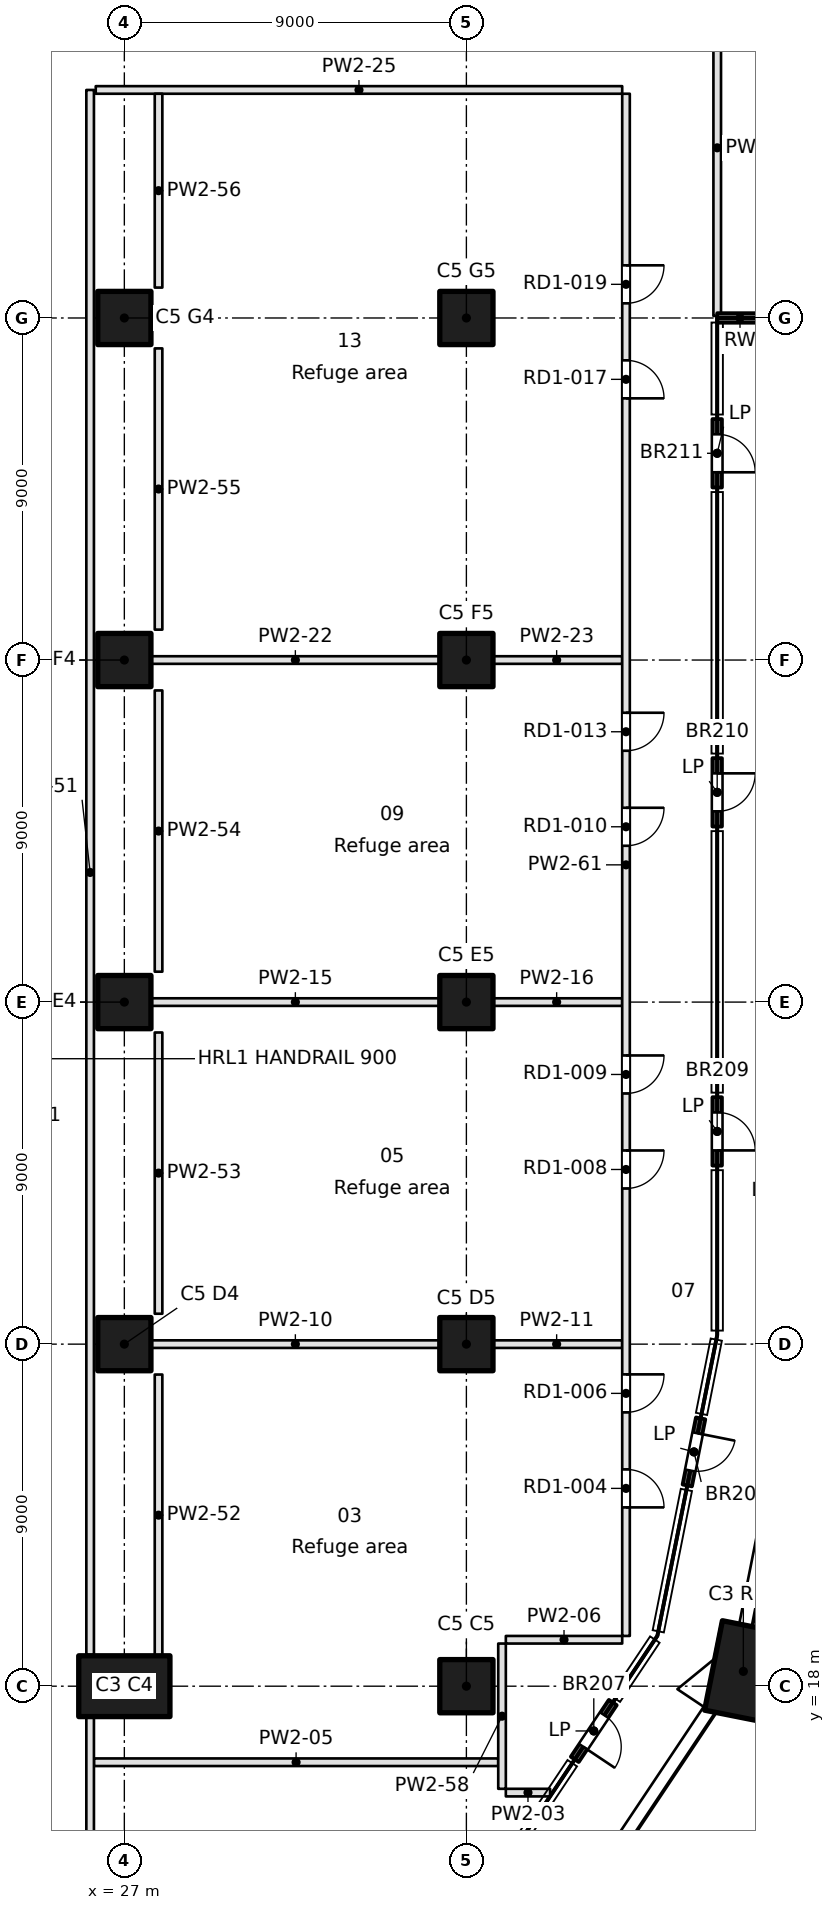
"""IFC4 building model, lengths in metres.
Left out: names, types, materials, properties, quantities, classifications, styles, units other than length and angle.
Written with IfcOpenShell. Run it as: python <this file> out.ifc"""

import sys

from ifc_helpers import new_model, si_unit, direction, frame, frame_2d, origin, origin_2d, place, context, subcontext, project, spatial, rectangle, extrude, element, fill, save


model = new_model("IFC4")
c1 = context("Model", 3, precision=1e-05, world=origin(), true_north=direction((0.0, 1.0)))
c2 = subcontext(c1, "Body", "Model", "MODEL_VIEW")
j1 = project(units=[si_unit("LENGTHUNIT", "METRE"), si_unit("PLANEANGLEUNIT", "RADIAN")], contexts=[c1])
p1 = place(None, origin())
s1 = spatial("IfcSite", under=j1, at=p1, CompositionType="ELEMENT")
p2 = place(p1, origin())
s2 = spatial("IfcBuilding", under=s1, at=p2, CompositionType="ELEMENT")
p3 = place(p2, frame((0.0, 0.0, 80.2)))
s3 = spatial("IfcBuildingStorey", under=s2, at=p3, CompositionType="ELEMENT", Elevation=80.2)
for number, where, z_axis, x_axis in (
    (1, (43.287, 18.39, 0.0), (0.0, 0.0, 1.0), (0.195, 0.981, 0.0)),
    (2, (27.0, 18.0, 0.0), (0.0, 0.0, 1.0), (1.0, 0.0, 0.0)),
):
    element("IfcColumn", number, at=place(p3, frame(where, z_axis=z_axis, x_axis=x_axis)), inside=s3, PredefinedType="COLUMN", context=c2, shape_type="SweptSolid", body=[
        extrude(rectangle(XDim=2.4, YDim=1.6, at=origin_2d()), origin(), (0.0, 0.0, 1.0), 4.6),
    ])
for number, where, z_axis, x_axis in (
    (3, (27.0, 27.0, 0.0), (0.0, 0.0, 1.0), (1.0, 0.0, 0.0)),
    (4, (27.0, 36.0, 0.0), (0.0, 0.0, 1.0), (1.0, 0.0, 0.0)),
    (5, (27.0, 45.0, 0.0), (0.0, 0.0, 1.0), (1.0, 0.0, 0.0)),
    (6, (27.0, 54.0, 0.0), (0.0, 0.0, 1.0), (1.0, 0.0, 0.0)),
    (7, (36.0, 18.0, 0.0), (0.0, 0.0, 1.0), (1.0, 0.0, 0.0)),
    (8, (36.0, 27.0, 0.0), (0.0, 0.0, 1.0), (1.0, 0.0, 0.0)),
    (9, (36.0, 36.0, 0.0), (0.0, 0.0, 1.0), (1.0, 0.0, 0.0)),
    (10, (36.0, 45.0, 0.0), (0.0, 0.0, 1.0), (1.0, 0.0, 0.0)),
    (11, (36.0, 54.0, 0.0), (0.0, 0.0, 1.0), (1.0, 0.0, 0.0)),
):
    element("IfcColumn", number, at=place(p3, frame(where, z_axis=z_axis, x_axis=x_axis)), inside=s3, PredefinedType="COLUMN", context=c2, shape_type="SweptSolid", body=[
        extrude(rectangle(XDim=1.4, YDim=1.4, at=origin_2d()), origin(), (0.0, 0.0, 1.0), 4.6),
    ])
p4 = place(p3, frame((38.852, 16.074, 0.0), z_axis=(0.0, 0.0, 1.0), x_axis=(0.555576323502, 0.83146554274, 0.0)))
e12 = element("IfcWall", 12, at=p4, inside=s3, PredefinedType="SOLIDWALL", context=c2, shape_type="SweptSolid", body=[
    extrude(rectangle(XDim=1.8, YDim=0.25, at=frame_2d((0.9, 0.0))), origin(), (0.0, 0.0, 1.0), 4.2),
])
p5 = place(p4, frame((0.4, 0.0, 0.0)))
e13 = element("IfcOpeningElement", 13, at=p5, cuts=e12, PredefinedType="OPENING", context=c2, shape_type="SweptSolid", body=[
    extrude(rectangle(XDim=1.0, YDim=2.1, at=frame_2d((0.5, 1.05))), frame((0.0, 0.125, 0.0), z_axis=(0.0, -1.0, 0.0), x_axis=(1.0, 0.0, 0.0)), (0.0, 0.0, 1.0), 0.25),
])
p6 = place(p3, frame((41.812, 23.281, 0.0), z_axis=(0.0, 0.0, 1.0), x_axis=(0.19517704197, 0.980768026746, 0.0)))
e14 = element("IfcWall", 14, at=p6, inside=s3, PredefinedType="SOLIDWALL", context=c2, shape_type="SweptSolid", body=[
    extrude(rectangle(XDim=1.8, YDim=0.25, at=frame_2d((0.9, 0.0))), origin(), (0.0, 0.0, 1.0), 4.2),
])
p7 = place(p6, frame((0.4, 0.0, 0.0)))
e15 = element("IfcOpeningElement", 15, at=p7, cuts=e14, PredefinedType="OPENING", context=c2, shape_type="SweptSolid", body=[
    extrude(rectangle(XDim=1.0, YDim=2.1, at=frame_2d((0.5, 1.05))), frame((0.0, 0.125, 0.0), z_axis=(0.0, -1.0, 0.0), x_axis=(1.0, 0.0, 0.0)), (0.0, 0.0, 1.0), 0.25),
])
p8 = place(p3, frame((42.599, 31.697, 0.0), z_axis=(0.0, 0.0, 1.0), x_axis=(0.0, 1.0, 0.0)))
e16 = element("IfcWall", 16, at=p8, inside=s3, PredefinedType="SOLIDWALL", context=c2, shape_type="SweptSolid", body=[
    extrude(rectangle(XDim=1.8, YDim=0.25, at=frame_2d((0.9, 0.0))), origin(), (0.0, 0.0, 1.0), 4.2),
])
p9 = place(p8, frame((0.4, 0.0, 0.0)))
e17 = element("IfcOpeningElement", 17, at=p9, cuts=e16, PredefinedType="OPENING", context=c2, shape_type="SweptSolid", body=[
    extrude(rectangle(XDim=1.0, YDim=2.1, at=frame_2d((0.5, 1.05))), frame((0.0, 0.125, 0.0), z_axis=(0.0, -1.0, 0.0), x_axis=(1.0, 0.0, 0.0)), (0.0, 0.0, 1.0), 0.25),
])
p10 = place(p3, frame((42.599, 40.619, 0.0), z_axis=(0.0, 0.0, 1.0), x_axis=(0.0, 1.0, 0.0)))
e18 = element("IfcWall", 18, at=p10, inside=s3, PredefinedType="SOLIDWALL", context=c2, shape_type="SweptSolid", body=[
    extrude(rectangle(XDim=1.8, YDim=0.25, at=frame_2d((0.9, 0.0))), origin(), (0.0, 0.0, 1.0), 4.2),
])
p11 = place(p10, frame((0.4, 0.0, 0.0)))
e19 = element("IfcOpeningElement", 19, at=p11, cuts=e18, PredefinedType="OPENING", context=c2, shape_type="SweptSolid", body=[
    extrude(rectangle(XDim=1.0, YDim=2.1, at=frame_2d((0.5, 1.05))), frame((0.0, 0.125, 0.0), z_axis=(0.0, -1.0, 0.0), x_axis=(1.0, 0.0, 0.0)), (0.0, 0.0, 1.0), 0.25),
])
p12 = place(p3, frame((42.599, 49.54, 0.0), z_axis=(0.0, 0.0, 1.0), x_axis=(0.0, 1.0, 0.0)))
e20 = element("IfcWall", 20, at=p12, inside=s3, PredefinedType="SOLIDWALL", context=c2, shape_type="SweptSolid", body=[
    extrude(rectangle(XDim=1.8, YDim=0.25, at=frame_2d((0.9, 0.0))), origin(), (0.0, 0.0, 1.0), 4.2),
])
p13 = place(p12, frame((0.4, 0.0, 0.0)))
e21 = element("IfcOpeningElement", 21, at=p13, cuts=e20, PredefinedType="OPENING", context=c2, shape_type="SweptSolid", body=[
    extrude(rectangle(XDim=1.0, YDim=2.1, at=frame_2d((0.5, 1.05))), frame((0.0, 0.125, 0.0), z_axis=(0.0, -1.0, 0.0), x_axis=(1.0, 0.0, 0.0)), (0.0, 0.0, 1.0), 0.25),
])
p14 = place(p3, frame((42.599, 54.001, 0.0), z_axis=(0.0, 0.0, 1.0), x_axis=(1.0, 0.0, 0.0)))
e22 = element("IfcWall", 22, at=p14, inside=s3, PredefinedType="SOLIDWALL", context=c2, shape_type="SweptSolid", body=[
    extrude(rectangle(XDim=1.201, YDim=0.25, at=frame_2d((0.6, 0.0))), origin(), (0.0, 0.0, 1.0), 4.2),
])
p15 = place(p3, frame((38.203, 15.2, 0.0), z_axis=(0.0, 0.0, 1.0), x_axis=(-1.0, 0.0, 0.0)))
e23 = element("IfcWall", 23, at=p15, inside=s3, PredefinedType="PARTITIONING", context=c2, shape_type="SweptSolid", body=[
    extrude(rectangle(XDim=1.165, YDim=0.2, at=frame_2d((0.583, 0.0))), origin(), (0.0, 0.0, 1.0), 4.2),
])
p16 = place(p3, frame((26.2, 15.999, 0.0), z_axis=(0.0, 0.0, 1.0), x_axis=(1.0, 0.0, 0.0)))
e24 = element("IfcWall", 24, at=p16, inside=s3, PredefinedType="PARTITIONING", context=c2, shape_type="SweptSolid", body=[
    extrude(rectangle(XDim=10.638, YDim=0.2, at=frame_2d((5.319, 0.0))), origin(), (0.0, 0.0, 1.0), 4.2),
])
p17 = place(p3, frame((37.038, 19.222, 0.0), z_axis=(0.0, 0.0, 1.0), x_axis=(1.0, 0.0, 0.0)))
e25 = element("IfcWall", 25, at=p17, inside=s3, PredefinedType="PARTITIONING", context=c2, shape_type="SweptSolid", body=[
    extrude(rectangle(XDim=3.062, YDim=0.2, at=frame_2d((1.531, 0.0))), origin(), (0.0, 0.0, 1.0), 4.2),
])
p18 = place(p3, frame((27.65, 27.0, 0.0), z_axis=(0.0, 0.0, 1.0), x_axis=(1.0, 0.0, 0.0)))
e26 = element("IfcWall", 26, at=p18, inside=s3, PredefinedType="PARTITIONING", context=c2, shape_type="SweptSolid", body=[
    extrude(rectangle(XDim=7.7, YDim=0.2, at=frame_2d((3.85, 0.0))), origin(), (0.0, 0.0, 1.0), 4.2),
])
p19 = place(p3, frame((36.65, 27.0, 0.0), z_axis=(0.0, 0.0, 1.0), x_axis=(1.0, 0.0, 0.0)))
e27 = element("IfcWall", 27, at=p19, inside=s3, PredefinedType="PARTITIONING", context=c2, shape_type="SweptSolid", body=[
    extrude(rectangle(XDim=3.45, YDim=0.2, at=frame_2d((1.725, 0.0))), origin(), (0.0, 0.0, 1.0), 4.2),
])
p20 = place(p3, frame((27.65, 36.0, 0.0), z_axis=(0.0, 0.0, 1.0), x_axis=(1.0, 0.0, 0.0)))
e28 = element("IfcWall", 28, at=p20, inside=s3, PredefinedType="PARTITIONING", context=c2, shape_type="SweptSolid", body=[
    extrude(rectangle(XDim=7.7, YDim=0.2, at=frame_2d((3.85, 0.0))), origin(), (0.0, 0.0, 1.0), 4.2),
])
p21 = place(p3, frame((36.65, 36.0, 0.0), z_axis=(0.0, 0.0, 1.0), x_axis=(1.0, 0.0, 0.0)))
e29 = element("IfcWall", 29, at=p21, inside=s3, PredefinedType="PARTITIONING", context=c2, shape_type="SweptSolid", body=[
    extrude(rectangle(XDim=3.45, YDim=0.2, at=frame_2d((1.725, 0.0))), origin(), (0.0, 0.0, 1.0), 4.2),
])
p22 = place(p3, frame((27.65, 45.0, 0.0), z_axis=(0.0, 0.0, 1.0), x_axis=(1.0, 0.0, 0.0)))
e30 = element("IfcWall", 30, at=p22, inside=s3, PredefinedType="PARTITIONING", context=c2, shape_type="SweptSolid", body=[
    extrude(rectangle(XDim=7.7, YDim=0.2, at=frame_2d((3.85, 0.0))), origin(), (0.0, 0.0, 1.0), 4.2),
])
p23 = place(p3, frame((36.65, 45.0, 0.0), z_axis=(0.0, 0.0, 1.0), x_axis=(1.0, 0.0, 0.0)))
e31 = element("IfcWall", 31, at=p23, inside=s3, PredefinedType="PARTITIONING", context=c2, shape_type="SweptSolid", body=[
    extrude(rectangle(XDim=3.45, YDim=0.2, at=frame_2d((1.725, 0.0))), origin(), (0.0, 0.0, 1.0), 4.2),
])
p24 = place(p3, frame((40.1, 60.0, 0.0), z_axis=(0.0, 0.0, 1.0), x_axis=(-1.0, 0.0, 0.0)))
e32 = element("IfcWall", 32, at=p24, inside=s3, PredefinedType="PARTITIONING", context=c2, shape_type="SweptSolid", body=[
    extrude(rectangle(XDim=13.853, YDim=0.2, at=frame_2d((6.926, 0.0))), origin(), (0.0, 0.0, 1.0), 4.2),
])
p25 = place(p3, frame((26.1, 17.25, 0.0), z_axis=(0.0, 0.0, 1.0), x_axis=(0.0, -1.0, 0.0)))
e33 = element("IfcWall", 33, at=p25, inside=s3, PredefinedType="PARTITIONING", context=c2, shape_type="SweptSolid", body=[
    extrude(rectangle(XDim=7.763, YDim=0.2, at=frame_2d((3.881, 0.0))), origin(), (0.0, 0.0, 1.0), 4.2),
])
p26 = place(p3, frame((26.1, 60.0, 0.0), z_axis=(0.0, 0.0, 1.0), x_axis=(0.0, -1.0, 0.0)))
e34 = element("IfcWall", 34, at=p26, inside=s3, PredefinedType="PARTITIONING", context=c2, shape_type="SweptSolid", body=[
    extrude(rectangle(XDim=41.177, YDim=0.2, at=frame_2d((20.588, 0.0))), origin(), (0.0, 0.0, 1.0), 4.2),
])
for number, where, z_axis, x_axis in (
    (35, (27.9, 26.2, 0.0), (0.0, 0.0, 1.0), (0.0, -1.0, 0.0)),
    (36, (27.9, 35.2, 0.0), (0.0, 0.0, 1.0), (0.0, -1.0, 0.0)),
    (37, (27.9, 44.2, 0.0), (0.0, 0.0, 1.0), (0.0, -1.0, 0.0)),
    (38, (27.9, 53.2, 0.0), (0.0, 0.0, 1.0), (0.0, -1.0, 0.0)),
):
    element("IfcWall", number, at=place(p3, frame(where, z_axis=z_axis, x_axis=x_axis)), inside=s3, PredefinedType="PARTITIONING", context=c2, shape_type="SweptSolid", body=[
        extrude(rectangle(XDim=7.4, YDim=0.2, at=frame_2d((3.7, 0.0))), origin(), (0.0, 0.0, 1.0), 4.2),
    ])
p27 = place(p3, frame((27.9, 59.9, 0.0), z_axis=(0.0, 0.0, 1.0), x_axis=(0.0, -1.0, 0.0)))
e39 = element("IfcWall", 39, at=p27, inside=s3, PredefinedType="PARTITIONING", context=c2, shape_type="SweptSolid", body=[
    extrude(rectangle(XDim=5.1, YDim=0.2, at=frame_2d((2.55, 0.0))), origin(), (0.0, 0.0, 1.0), 4.2),
])
p28 = place(p3, frame((36.938, 15.3, 0.0), z_axis=(0.0, 0.0, 1.0), x_axis=(0.0, 1.0, 0.0)))
e40 = element("IfcWall", 40, at=p28, inside=s3, PredefinedType="PARTITIONING", context=c2, shape_type="SweptSolid", body=[
    extrude(rectangle(XDim=3.822, YDim=0.2, at=frame_2d((1.911, 0.0))), origin(), (0.0, 0.0, 1.0), 4.2),
])
p29 = place(p3, frame((40.2, 19.322, 0.0), z_axis=(0.0, 0.0, 1.0), x_axis=(0.0, 1.0, 0.0)))
e41 = element("IfcWall", 41, at=p29, inside=s3, PredefinedType="PARTITIONING", context=c2, shape_type="SweptSolid", body=[
    extrude(rectangle(XDim=40.578, YDim=0.2, at=frame_2d((20.289, 0.0))), origin(), (0.0, 0.0, 1.0), 4.2),
])
p30 = place(p29, frame((3.383, 0.0, 0.0)))
e42 = element("IfcOpeningElement", 42, at=p30, cuts=e41, PredefinedType="OPENING", context=c2, shape_type="SweptSolid", body=[
    extrude(rectangle(XDim=1.0, YDim=2.1, at=frame_2d((0.5, 1.05))), frame((0.0, 0.1, 0.0), z_axis=(0.0, -1.0, 0.0), x_axis=(1.0, 0.0, 0.0)), (0.0, 0.0, 1.0), 0.2),
])
p31 = place(p29, frame((5.883, 0.0, 0.0)))
e43 = element("IfcOpeningElement", 43, at=p31, cuts=e41, PredefinedType="OPENING", context=c2, shape_type="SweptSolid", body=[
    extrude(rectangle(XDim=1.0, YDim=2.1, at=frame_2d((0.5, 1.05))), frame((0.0, 0.1, 0.0), z_axis=(0.0, -1.0, 0.0), x_axis=(1.0, 0.0, 0.0)), (0.0, 0.0, 1.0), 0.2),
])
p32 = place(p29, frame((11.774, 0.0, 0.0)))
e44 = element("IfcOpeningElement", 44, at=p32, cuts=e41, PredefinedType="OPENING", context=c2, shape_type="SweptSolid", body=[
    extrude(rectangle(XDim=1.0, YDim=2.1, at=frame_2d((0.5, 1.05))), frame((0.0, 0.1, 0.0), z_axis=(0.0, -1.0, 0.0), x_axis=(1.0, 0.0, 0.0)), (0.0, 0.0, 1.0), 0.2),
])
p33 = place(p29, frame((14.274, 0.0, 0.0)))
e45 = element("IfcOpeningElement", 45, at=p33, cuts=e41, PredefinedType="OPENING", context=c2, shape_type="SweptSolid", body=[
    extrude(rectangle(XDim=1.0, YDim=2.1, at=frame_2d((0.5, 1.05))), frame((0.0, 0.1, 0.0), z_axis=(0.0, -1.0, 0.0), x_axis=(1.0, 0.0, 0.0)), (0.0, 0.0, 1.0), 0.2),
])
p34 = place(p29, frame((20.791, 0.0, 0.0)))
e46 = element("IfcOpeningElement", 46, at=p34, cuts=e41, PredefinedType="OPENING", context=c2, shape_type="SweptSolid", body=[
    extrude(rectangle(XDim=1.0, YDim=2.1, at=frame_2d((0.5, 1.05))), frame((0.0, 0.1, 0.0), z_axis=(0.0, -1.0, 0.0), x_axis=(1.0, 0.0, 0.0)), (0.0, 0.0, 1.0), 0.2),
])
p35 = place(p29, frame((23.291, 0.0, 0.0)))
e47 = element("IfcOpeningElement", 47, at=p35, cuts=e41, PredefinedType="OPENING", context=c2, shape_type="SweptSolid", body=[
    extrude(rectangle(XDim=1.0, YDim=2.1, at=frame_2d((0.5, 1.05))), frame((0.0, 0.1, 0.0), z_axis=(0.0, -1.0, 0.0), x_axis=(1.0, 0.0, 0.0)), (0.0, 0.0, 1.0), 0.2),
])
p36 = place(p29, frame((32.564, 0.0, 0.0)))
e48 = element("IfcOpeningElement", 48, at=p36, cuts=e41, PredefinedType="OPENING", context=c2, shape_type="SweptSolid", body=[
    extrude(rectangle(XDim=1.0, YDim=2.1, at=frame_2d((0.5, 1.05))), frame((0.0, 0.1, 0.0), z_axis=(0.0, -1.0, 0.0), x_axis=(1.0, 0.0, 0.0)), (0.0, 0.0, 1.0), 0.2),
])
p37 = place(p29, frame((35.064, 0.0, 0.0)))
e49 = element("IfcOpeningElement", 49, at=p37, cuts=e41, PredefinedType="OPENING", context=c2, shape_type="SweptSolid", body=[
    extrude(rectangle(XDim=1.0, YDim=2.1, at=frame_2d((0.5, 1.05))), frame((0.0, 0.1, 0.0), z_axis=(0.0, -1.0, 0.0), x_axis=(1.0, 0.0, 0.0)), (0.0, 0.0, 1.0), 0.2),
])
p38 = place(p3, frame((42.6, 62.9, 0.0), z_axis=(0.0, 0.0, 1.0), x_axis=(0.0, -1.0, 0.0)))
e50 = element("IfcWall", 50, at=p38, inside=s3, PredefinedType="PARTITIONING", context=c2, shape_type="SweptSolid", body=[
    extrude(rectangle(XDim=8.845, YDim=0.2, at=frame_2d((4.423, 0.0))), origin(), (0.0, 0.0, 1.0), 4.2),
])
p39 = place(p5, frame((1.0, 0.0, 0.0), z_axis=(0.0, 0.0, 1.0), x_axis=(-1.0, 0.0, 0.0)))
e51 = element("IfcDoor", 51, at=p39, inside=s3, OperationType="SINGLE_SWING_RIGHT", PredefinedType="DOOR", context=c2, shape_type="SweptSolid", body=[
    extrude(rectangle(XDim=1.0, YDim=2.1, at=frame_2d((0.5, 1.05))), frame((0.0, 0.025, 0.0), z_axis=(0.0, -1.0, 0.0), x_axis=(1.0, 0.0, 0.0)), (0.0, 0.0, 1.0), 0.05),
])
fill(e13, e51)
p40 = place(p7, frame((1.0, 0.0, 0.0), z_axis=(0.0, 0.0, 1.0), x_axis=(-1.0, 0.0, 0.0)))
e52 = element("IfcDoor", 52, at=p40, inside=s3, OperationType="SINGLE_SWING_LEFT", PredefinedType="DOOR", context=c2, shape_type="SweptSolid", body=[
    extrude(rectangle(XDim=1.0, YDim=2.1, at=frame_2d((0.5, 1.05))), frame((0.0, 0.025, 0.0), z_axis=(0.0, -1.0, 0.0), x_axis=(1.0, 0.0, 0.0)), (0.0, 0.0, 1.0), 0.05),
])
fill(e15, e52)
p41 = place(p9, frame((1.0, 0.0, 0.0), z_axis=(0.0, 0.0, 1.0), x_axis=(-1.0, 0.0, 0.0)))
e53 = element("IfcDoor", 53, at=p41, inside=s3, OperationType="SINGLE_SWING_RIGHT", PredefinedType="DOOR", context=c2, shape_type="SweptSolid", body=[
    extrude(rectangle(XDim=1.0, YDim=2.1, at=frame_2d((0.5, 1.05))), frame((0.0, 0.025, 0.0), z_axis=(0.0, -1.0, 0.0), x_axis=(1.0, 0.0, 0.0)), (0.0, 0.0, 1.0), 0.05),
])
fill(e17, e53)
p42 = place(p11, frame((1.0, 0.0, 0.0), z_axis=(0.0, 0.0, 1.0), x_axis=(-1.0, 0.0, 0.0)))
e54 = element("IfcDoor", 54, at=p42, inside=s3, OperationType="SINGLE_SWING_LEFT", PredefinedType="DOOR", context=c2, shape_type="SweptSolid", body=[
    extrude(rectangle(XDim=1.0, YDim=2.1, at=frame_2d((0.5, 1.05))), frame((0.0, 0.025, 0.0), z_axis=(0.0, -1.0, 0.0), x_axis=(1.0, 0.0, 0.0)), (0.0, 0.0, 1.0), 0.05),
])
fill(e19, e54)
p43 = place(p13, frame((1.0, 0.0, 0.0), z_axis=(0.0, 0.0, 1.0), x_axis=(-1.0, 0.0, 0.0)))
e55 = element("IfcDoor", 55, at=p43, inside=s3, OperationType="SINGLE_SWING_RIGHT", PredefinedType="DOOR", context=c2, shape_type="SweptSolid", body=[
    extrude(rectangle(XDim=1.0, YDim=2.1, at=frame_2d((0.5, 1.05))), frame((0.0, 0.025, 0.0), z_axis=(0.0, -1.0, 0.0), x_axis=(1.0, 0.0, 0.0)), (0.0, 0.0, 1.0), 0.05),
])
fill(e21, e55)
p44 = place(p30, frame((1.0, 0.0, 0.0), z_axis=(0.0, 0.0, 1.0), x_axis=(-1.0, 0.0, 0.0)))
e56 = element("IfcDoor", 56, at=p44, inside=s3, OperationType="SINGLE_SWING_RIGHT", PredefinedType="DOOR", context=c2, shape_type="SweptSolid", body=[
    extrude(rectangle(XDim=1.0, YDim=2.1, at=frame_2d((0.5, 1.05))), frame((0.0, 0.025, 0.0), z_axis=(0.0, -1.0, 0.0), x_axis=(1.0, 0.0, 0.0)), (0.0, 0.0, 1.0), 0.05),
])
fill(e42, e56)
p45 = place(p31, frame((1.0, 0.0, 0.0), z_axis=(0.0, 0.0, 1.0), x_axis=(-1.0, 0.0, 0.0)))
e57 = element("IfcDoor", 57, at=p45, inside=s3, OperationType="SINGLE_SWING_LEFT", PredefinedType="DOOR", context=c2, shape_type="SweptSolid", body=[
    extrude(rectangle(XDim=1.0, YDim=2.1, at=frame_2d((0.5, 1.05))), frame((0.0, 0.025, 0.0), z_axis=(0.0, -1.0, 0.0), x_axis=(1.0, 0.0, 0.0)), (0.0, 0.0, 1.0), 0.05),
])
fill(e43, e57)
p46 = place(p32, frame((1.0, 0.0, 0.0), z_axis=(0.0, 0.0, 1.0), x_axis=(-1.0, 0.0, 0.0)))
e58 = element("IfcDoor", 58, at=p46, inside=s3, OperationType="SINGLE_SWING_LEFT", PredefinedType="DOOR", context=c2, shape_type="SweptSolid", body=[
    extrude(rectangle(XDim=1.0, YDim=2.1, at=frame_2d((0.5, 1.05))), frame((0.0, 0.025, 0.0), z_axis=(0.0, -1.0, 0.0), x_axis=(1.0, 0.0, 0.0)), (0.0, 0.0, 1.0), 0.05),
])
fill(e44, e58)
p47 = place(p33, frame((1.0, 0.0, 0.0), z_axis=(0.0, 0.0, 1.0), x_axis=(-1.0, 0.0, 0.0)))
e59 = element("IfcDoor", 59, at=p47, inside=s3, OperationType="SINGLE_SWING_LEFT", PredefinedType="DOOR", context=c2, shape_type="SweptSolid", body=[
    extrude(rectangle(XDim=1.0, YDim=2.1, at=frame_2d((0.5, 1.05))), frame((0.0, 0.025, 0.0), z_axis=(0.0, -1.0, 0.0), x_axis=(1.0, 0.0, 0.0)), (0.0, 0.0, 1.0), 0.05),
])
fill(e45, e59)
p48 = place(p34, frame((1.0, 0.0, 0.0), z_axis=(0.0, 0.0, 1.0), x_axis=(-1.0, 0.0, 0.0)))
e60 = element("IfcDoor", 60, at=p48, inside=s3, OperationType="SINGLE_SWING_LEFT", PredefinedType="DOOR", context=c2, shape_type="SweptSolid", body=[
    extrude(rectangle(XDim=1.0, YDim=2.1, at=frame_2d((0.5, 1.05))), frame((0.0, 0.025, 0.0), z_axis=(0.0, -1.0, 0.0), x_axis=(1.0, 0.0, 0.0)), (0.0, 0.0, 1.0), 0.05),
])
fill(e46, e60)
p49 = place(p35, frame((1.0, 0.0, 0.0), z_axis=(0.0, 0.0, 1.0), x_axis=(-1.0, 0.0, 0.0)))
e61 = element("IfcDoor", 61, at=p49, inside=s3, OperationType="SINGLE_SWING_LEFT", PredefinedType="DOOR", context=c2, shape_type="SweptSolid", body=[
    extrude(rectangle(XDim=1.0, YDim=2.1, at=frame_2d((0.5, 1.05))), frame((0.0, 0.025, 0.0), z_axis=(0.0, -1.0, 0.0), x_axis=(1.0, 0.0, 0.0)), (0.0, 0.0, 1.0), 0.05),
])
fill(e47, e61)
p50 = place(p36, frame((1.0, 0.0, 0.0), z_axis=(0.0, 0.0, 1.0), x_axis=(-1.0, 0.0, 0.0)))
e62 = element("IfcDoor", 62, at=p50, inside=s3, OperationType="SINGLE_SWING_RIGHT", PredefinedType="DOOR", context=c2, shape_type="SweptSolid", body=[
    extrude(rectangle(XDim=1.0, YDim=2.1, at=frame_2d((0.5, 1.05))), frame((0.0, 0.025, 0.0), z_axis=(0.0, -1.0, 0.0), x_axis=(1.0, 0.0, 0.0)), (0.0, 0.0, 1.0), 0.05),
])
fill(e48, e62)
p51 = place(p37, frame((1.0, 0.0, 0.0), z_axis=(0.0, 0.0, 1.0), x_axis=(-1.0, 0.0, 0.0)))
e63 = element("IfcDoor", 63, at=p51, inside=s3, OperationType="SINGLE_SWING_LEFT", PredefinedType="DOOR", context=c2, shape_type="SweptSolid", body=[
    extrude(rectangle(XDim=1.0, YDim=2.1, at=frame_2d((0.5, 1.05))), frame((0.0, 0.025, 0.0), z_axis=(0.0, -1.0, 0.0), x_axis=(1.0, 0.0, 0.0)), (0.0, 0.0, 1.0), 0.05),
])
fill(e49, e63)
save(model, sys.argv[1])
